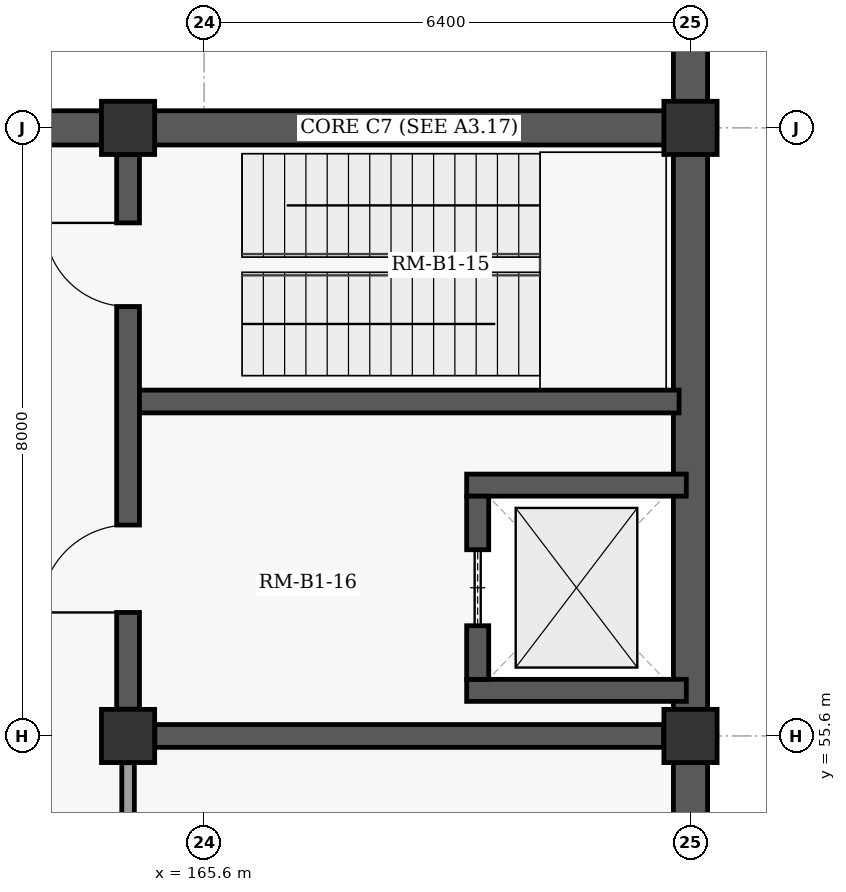
"""IFC4 building model, lengths in metres.
Left out: names, types, materials, properties, quantities, classifications, styles, units other than length and angle.
Written with IfcOpenShell. Run it as: python <this file> out.ifc"""

import sys

from ifc_helpers import new_model, si_unit, direction, frame, frame_2d, origin, origin_2d, place, context, subcontext, project, spatial, rectangle, extrude, element, fill, save


model = new_model("IFC4")
c1 = context("Model", 3, precision=1e-05, world=origin(), true_north=direction((0.0, 1.0)))
c2 = subcontext(c1, "Body", "Model", "MODEL_VIEW")
j1 = project(units=[si_unit("LENGTHUNIT", "METRE"), si_unit("PLANEANGLEUNIT", "RADIAN")], contexts=[c1])
p1 = place(None, origin())
s1 = spatial("IfcSite", under=j1, at=p1, CompositionType="ELEMENT")
p2 = place(p1, origin())
s2 = spatial("IfcBuilding", under=s1, at=p2, CompositionType="ELEMENT")
p3 = place(p2, frame((0.0, 0.0, -4.8)))
s3 = spatial("IfcBuildingStorey", under=s2, at=p3, CompositionType="ELEMENT", Elevation=-4.8)
for number, where, z_axis, x_axis in (
    (1, (164.6, 55.6, 0.0), (0.0, 0.0, 1.0), (1.0, 0.0, 0.0)),
    (2, (164.6, 63.6, 0.0), (0.0, 0.0, 1.0), (1.0, 0.0, 0.0)),
    (3, (172.0, 55.6, 0.0), (0.0, 0.0, 1.0), (1.0, 0.0, 0.0)),
    (4, (172.0, 63.6, 0.0), (0.0, 0.0, 1.0), (1.0, 0.0, 0.0)),
):
    element("IfcColumn", number, at=place(p3, frame(where, z_axis=z_axis, x_axis=x_axis)), inside=s3, PredefinedType="COLUMN", context=c2, shape_type="SweptSolid", body=[
        extrude(rectangle(XDim=0.7, YDim=0.7, at=origin_2d()), origin(), (0.0, 0.0, 1.0), 4.8),
    ])
p4 = place(p3, frame((172.0, 63.62, 0.0), z_axis=(0.0, 0.0, 1.0), x_axis=(0.0, 1.0, 0.0)))
e5 = element("IfcWall", 5, at=p4, inside=s3, PredefinedType="USERDEFINED", context=c2, shape_type="SweptSolid", body=[
    extrude(rectangle(XDim=7.96, YDim=0.45, at=frame_2d((3.98, 0.0))), origin(), (0.0, 0.0, 1.0), 4.53),
])
p5 = place(p3, frame((149.2, 63.6, 0.0), z_axis=(0.0, 0.0, 1.0), x_axis=(1.0, 0.0, 0.0)))
e6 = element("IfcWall", 6, at=p5, inside=s3, PredefinedType="USERDEFINED", context=c2, shape_type="SweptSolid", body=[
    extrude(rectangle(XDim=22.8, YDim=0.45, at=frame_2d((11.4, 0.0))), origin(), (0.0, 0.0, 1.0), 3.65),
])
p6 = place(p3, frame((172.0, 63.6, 0.0), z_axis=(0.0, 0.0, 1.0), x_axis=(0.0, -1.0, 0.0)))
e7 = element("IfcWall", 7, at=p6, inside=s3, PredefinedType="USERDEFINED", context=c2, shape_type="SweptSolid", body=[
    extrude(rectangle(XDim=56.0, YDim=0.45, at=frame_2d((28.0, 0.0))), origin(), (0.0, 0.0, 1.0), 3.65),
])
p7 = place(p3, frame((164.952, 55.6, 0.0), z_axis=(0.0, 0.0, 1.0), x_axis=(1.0, 0.0, 0.0)))
e8 = element("IfcWall", 8, at=p7, inside=s3, PredefinedType="SHEAR", context=c2, shape_type="SweptSolid", body=[
    extrude(rectangle(XDim=6.696, YDim=0.3, at=frame_2d((3.348, 0.0))), origin(), (0.0, 0.0, 1.0), 4.5),
])
p8 = place(p3, frame((164.6, 55.952, 0.0), z_axis=(0.0, 0.0, 1.0), x_axis=(0.0, 1.0, 0.0)))
e9 = element("IfcWall", 9, at=p8, inside=s3, PredefinedType="SHEAR", context=c2, shape_type="SweptSolid", body=[
    extrude(rectangle(XDim=7.296, YDim=0.3, at=frame_2d((3.648, 0.0))), origin(), (0.0, 0.0, 1.0), 4.5),
])
p9 = place(p8, frame((5.298, 0.0, 0.0)))
e10 = element("IfcOpeningElement", 10, at=p9, cuts=e9, PredefinedType="OPENING", context=c2, shape_type="SweptSolid", body=[
    extrude(rectangle(XDim=1.1, YDim=2.15, at=frame_2d((0.55, 1.075))), frame((0.0, 0.16, 0.0), z_axis=(0.0, -1.0, 0.0), x_axis=(1.0, 0.0, 0.0)), (0.0, 0.0, 1.0), 0.32),
])
p10 = place(p8, frame((1.273, 0.0, 0.0)))
e11 = element("IfcOpeningElement", 11, at=p10, cuts=e9, PredefinedType="OPENING", context=c2, shape_type="SweptSolid", body=[
    extrude(rectangle(XDim=1.15, YDim=2.2, at=frame_2d((0.575, 1.1))), frame((0.0, 0.16, 0.0), z_axis=(0.0, -1.0, 0.0), x_axis=(1.0, 0.0, 0.0)), (0.0, 0.0, 1.0), 0.32),
])
p11 = place(p3, frame((164.75, 60.0, 0.0), z_axis=(0.0, 0.0, 1.0), x_axis=(1.0, 0.0, 0.0)))
e12 = element("IfcWall", 12, at=p11, inside=s3, PredefinedType="SHEAR", context=c2, shape_type="SweptSolid", body=[
    extrude(rectangle(XDim=7.1, YDim=0.3, at=frame_2d((3.55, 0.0))), origin(), (0.0, 0.0, 1.0), 4.5),
])
for number, where, z_axis, x_axis in (
    (13, (169.055, 56.2, 0.0), (0.0, 0.0, 1.0), (1.0, 0.0, 0.0)),
    (14, (169.055, 58.9, 0.0), (0.0, 0.0, 1.0), (1.0, 0.0, 0.0)),
):
    element("IfcWall", number, at=place(p3, frame(where, z_axis=z_axis, x_axis=x_axis)), inside=s3, PredefinedType="SHEAR", context=c2, shape_type="SweptSolid", body=[
        extrude(rectangle(XDim=2.89, YDim=0.29, at=frame_2d((1.445, 0.0))), origin(), (0.0, 0.0, 1.0), 4.5),
    ])
p12 = place(p3, frame((169.2, 56.345, 0.0), z_axis=(0.0, 0.0, 1.0), x_axis=(0.0, 1.0, 0.0)))
e15 = element("IfcWall", 15, at=p12, inside=s3, PredefinedType="SHEAR", context=c2, shape_type="SweptSolid", body=[
    extrude(rectangle(XDim=2.41, YDim=0.29, at=frame_2d((1.205, 0.0))), origin(), (0.0, 0.0, 1.0), 4.5),
])
p13 = place(p12, frame((0.705, 0.0, 0.0)))
e16 = element("IfcOpeningElement", 16, at=p13, cuts=e15, PredefinedType="OPENING", context=c2, shape_type="SweptSolid", body=[
    extrude(rectangle(XDim=1.0, YDim=2.15, at=frame_2d((0.5, 1.075))), frame((0.0, 0.155, 0.0), z_axis=(0.0, -1.0, 0.0), x_axis=(1.0, 0.0, 0.0)), (0.0, 0.0, 1.0), 0.31),
])
p14 = place(p3, frame((164.6, 55.248, 0.0), z_axis=(0.0, 0.0, 1.0), x_axis=(0.0, -1.0, 0.0)))
e17 = element("IfcWall", 17, at=p14, inside=s3, PredefinedType="PARTITIONING", context=c2, shape_type="SweptSolid", body=[
    extrude(rectangle(XDim=47.296, YDim=0.165, at=frame_2d((23.648, 0.0))), origin(), (0.0, 0.0, 1.0), 3.65),
])
p15 = place(p14, frame((22.18, 0.0, 0.0)))
e18 = element("IfcOpeningElement", 18, at=p15, cuts=e17, PredefinedType="OPENING", context=c2, shape_type="SweptSolid", body=[
    extrude(rectangle(XDim=1.0, YDim=2.1, at=frame_2d((0.5, 1.05))), frame((0.0, 0.093, 0.0), z_axis=(0.0, -1.0, 0.0), x_axis=(1.0, 0.0, 0.0)), (0.0, 0.0, 1.0), 0.185),
])
p16 = place(p14, frame((36.391, 0.0, 0.0)))
e19 = element("IfcOpeningElement", 19, at=p16, cuts=e17, PredefinedType="OPENING", context=c2, shape_type="SweptSolid", body=[
    extrude(rectangle(XDim=1.0, YDim=2.1, at=frame_2d((0.5, 1.05))), frame((0.0, 0.093, 0.0), z_axis=(0.0, -1.0, 0.0), x_axis=(1.0, 0.0, 0.0)), (0.0, 0.0, 1.0), 0.185),
])
p17 = place(p9, origin())
e20 = element("IfcDoor", 20, at=p17, inside=s3, OperationType="SINGLE_SWING_RIGHT", PredefinedType="DOOR", context=c2, shape_type="SweptSolid", body=[
    extrude(rectangle(XDim=1.1, YDim=2.15, at=frame_2d((0.55, 1.075))), frame((0.0, 0.025, 0.0), z_axis=(0.0, -1.0, 0.0), x_axis=(1.0, 0.0, 0.0)), (0.0, 0.0, 1.0), 0.05),
])
fill(e10, e20)
p18 = place(p10, origin())
e21 = element("IfcDoor", 21, at=p18, inside=s3, OperationType="SINGLE_SWING_LEFT", PredefinedType="DOOR", context=c2, shape_type="SweptSolid", body=[
    extrude(rectangle(XDim=1.15, YDim=2.2, at=frame_2d((0.575, 1.1))), frame((0.0, 0.025, 0.0), z_axis=(0.0, -1.0, 0.0), x_axis=(1.0, 0.0, 0.0)), (0.0, 0.0, 1.0), 0.05),
])
fill(e11, e21)
p19 = place(p13, origin())
e22 = element("IfcDoor", 22, at=p19, inside=s3, OperationType="SLIDING_TO_LEFT", PredefinedType="DOOR", context=c2, shape_type="SweptSolid", body=[
    extrude(rectangle(XDim=1.0, YDim=2.15, at=frame_2d((0.5, 1.075))), frame((0.0, 0.025, 0.0), z_axis=(0.0, -1.0, 0.0), x_axis=(1.0, 0.0, 0.0)), (0.0, 0.0, 1.0), 0.05),
])
fill(e16, e22)
save(model, sys.argv[1])
